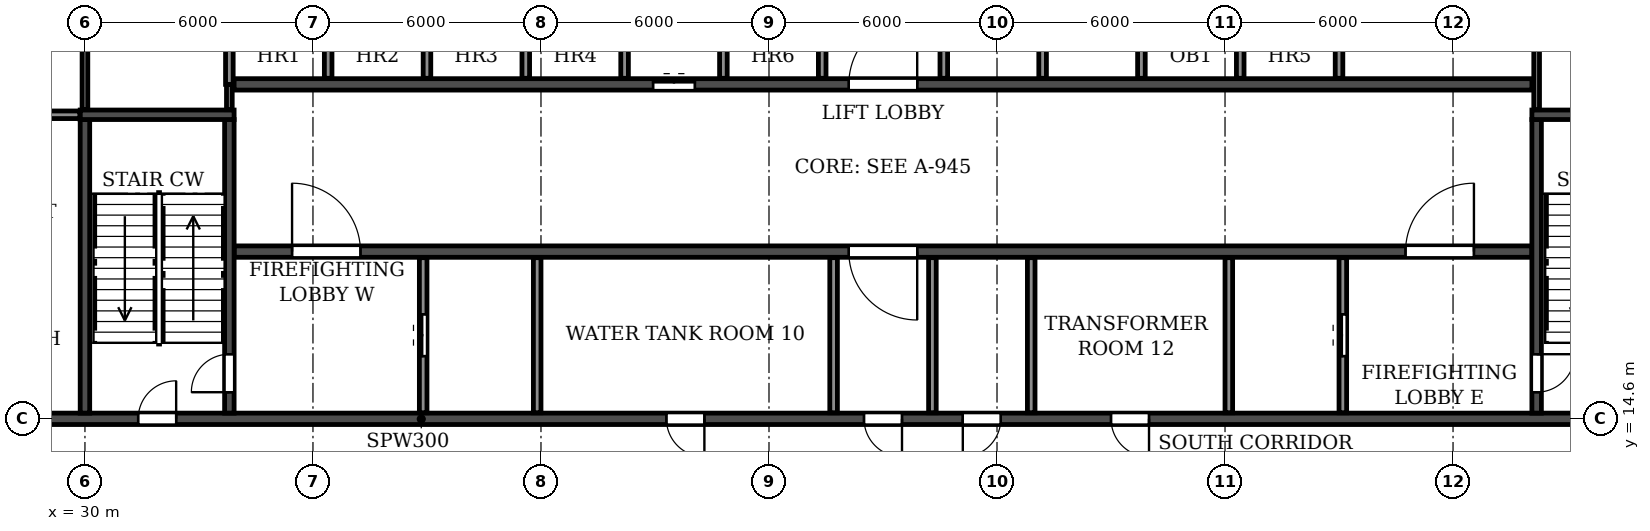
"""IFC4 building model, lengths in metres.
Left out: names, types, materials, properties, quantities, classifications, styles, units other than length and angle.
Written with IfcOpenShell. Run it as: python <this file> out.ifc"""

import sys

from ifc_helpers import new_model, si_unit, direction, frame, frame_2d, origin, place, context, subcontext, project, spatial, rectangle, extrude, element, fill, save


model = new_model("IFC4")
c1 = context("Model", 3, precision=1e-05, world=origin(), true_north=direction((0.0, 1.0)))
c2 = subcontext(c1, "Body", "Model", "MODEL_VIEW")
j1 = project(units=[si_unit("LENGTHUNIT", "METRE"), si_unit("PLANEANGLEUNIT", "RADIAN")], contexts=[c1])
p1 = place(None, origin())
s1 = spatial("IfcSite", under=j1, at=p1, CompositionType="ELEMENT")
p2 = place(p1, origin())
s2 = spatial("IfcBuilding", under=s1, at=p2, CompositionType="ELEMENT")
p3 = place(p2, frame((0.0, 0.0, 267.0)))
s3 = spatial("IfcBuildingStorey", under=s2, at=p3, CompositionType="ELEMENT", Elevation=267.0)
p4 = place(p3, frame((18.2, 14.6, 0.0), z_axis=(0.0, 0.0, 1.0), x_axis=(1.0, 0.0, 0.0)))
e1 = element("IfcWall", 1, at=p4, inside=s3, PredefinedType="SOLIDWALL", context=c2, shape_type="SweptSolid", body=[
    extrude(rectangle(XDim=65.6, YDim=0.3, at=frame_2d((32.8, 0.0))), origin(), (0.0, 0.0, 1.0), 5.15),
])
p5 = place(p4, frame((0.7, 0.0, 0.0)))
e2 = element("IfcOpeningElement", 2, at=p5, cuts=e1, PredefinedType="OPENING", context=c2, shape_type="SweptSolid", body=[
    extrude(rectangle(XDim=1.0, YDim=2.1, at=frame_2d((0.5, 1.05))), frame((0.0, 0.16, 0.0), z_axis=(0.0, -1.0, 0.0), x_axis=(1.0, 0.0, 0.0)), (0.0, 0.0, 1.0), 0.32),
])
p6 = place(p4, frame((8.35, 0.0, 0.0)))
e3 = element("IfcOpeningElement", 3, at=p6, cuts=e1, PredefinedType="OPENING", context=c2, shape_type="SweptSolid", body=[
    extrude(rectangle(XDim=1.5, YDim=2.1, at=frame_2d((0.75, 1.05))), frame((0.0, 0.16, 0.0), z_axis=(0.0, -1.0, 0.0), x_axis=(1.0, 0.0, 0.0)), (0.0, 0.0, 1.0), 0.32),
])
p7 = place(p4, frame((13.2, 0.0, 0.0)))
e4 = element("IfcOpeningElement", 4, at=p7, cuts=e1, PredefinedType="OPENING", context=c2, shape_type="SweptSolid", body=[
    extrude(rectangle(XDim=1.0, YDim=2.1, at=frame_2d((0.5, 1.05))), frame((0.0, 0.16, 0.0), z_axis=(0.0, -1.0, 0.0), x_axis=(1.0, 0.0, 0.0)), (0.0, 0.0, 1.0), 0.32),
])
p8 = place(p4, frame((27.1, 0.0, 0.0)))
e5 = element("IfcOpeningElement", 5, at=p8, cuts=e1, PredefinedType="OPENING", context=c2, shape_type="SweptSolid", body=[
    extrude(rectangle(XDim=1.0, YDim=2.1, at=frame_2d((0.5, 1.05))), frame((0.0, 0.16, 0.0), z_axis=(0.0, -1.0, 0.0), x_axis=(1.0, 0.0, 0.0)), (0.0, 0.0, 1.0), 0.32),
])
p9 = place(p4, frame((32.3, 0.0, 0.0)))
e6 = element("IfcOpeningElement", 6, at=p9, cuts=e1, PredefinedType="OPENING", context=c2, shape_type="SweptSolid", body=[
    extrude(rectangle(XDim=1.0, YDim=2.1, at=frame_2d((0.5, 1.05))), frame((0.0, 0.16, 0.0), z_axis=(0.0, -1.0, 0.0), x_axis=(1.0, 0.0, 0.0)), (0.0, 0.0, 1.0), 0.32),
])
p10 = place(p4, frame((34.9, 0.0, 0.0)))
e7 = element("IfcOpeningElement", 7, at=p10, cuts=e1, PredefinedType="OPENING", context=c2, shape_type="SweptSolid", body=[
    extrude(rectangle(XDim=1.0, YDim=2.1, at=frame_2d((0.5, 1.05))), frame((0.0, 0.16, 0.0), z_axis=(0.0, -1.0, 0.0), x_axis=(1.0, 0.0, 0.0)), (0.0, 0.0, 1.0), 0.32),
])
p11 = place(p4, frame((38.8, 0.0, 0.0)))
e8 = element("IfcOpeningElement", 8, at=p11, cuts=e1, PredefinedType="OPENING", context=c2, shape_type="SweptSolid", body=[
    extrude(rectangle(XDim=1.0, YDim=2.1, at=frame_2d((0.5, 1.05))), frame((0.0, 0.16, 0.0), z_axis=(0.0, -1.0, 0.0), x_axis=(1.0, 0.0, 0.0)), (0.0, 0.0, 1.0), 0.32),
])
p12 = place(p4, frame((51.4, 0.0, 0.0)))
e9 = element("IfcOpeningElement", 9, at=p12, cuts=e1, PredefinedType="OPENING", context=c2, shape_type="SweptSolid", body=[
    extrude(rectangle(XDim=1.0, YDim=2.1, at=frame_2d((0.5, 1.05))), frame((0.0, 0.16, 0.0), z_axis=(0.0, -1.0, 0.0), x_axis=(1.0, 0.0, 0.0)), (0.0, 0.0, 1.0), 0.32),
])
p13 = place(p4, frame((55.75, 0.0, 0.0)))
e10 = element("IfcOpeningElement", 10, at=p13, cuts=e1, PredefinedType="OPENING", context=c2, shape_type="SweptSolid", body=[
    extrude(rectangle(XDim=1.5, YDim=2.1, at=frame_2d((0.75, 1.05))), frame((0.0, 0.16, 0.0), z_axis=(0.0, -1.0, 0.0), x_axis=(1.0, 0.0, 0.0)), (0.0, 0.0, 1.0), 0.32),
])
p14 = place(p4, frame((63.9, 0.0, 0.0)))
e11 = element("IfcOpeningElement", 11, at=p14, cuts=e1, PredefinedType="OPENING", context=c2, shape_type="SweptSolid", body=[
    extrude(rectangle(XDim=1.0, YDim=2.1, at=frame_2d((0.5, 1.05))), frame((0.0, 0.16, 0.0), z_axis=(0.0, -1.0, 0.0), x_axis=(1.0, 0.0, 0.0)), (0.0, 0.0, 1.0), 0.32),
])
p15 = place(p3, frame((33.925, 19.0, 0.0), z_axis=(0.0, 0.0, 1.0), x_axis=(1.0, 0.0, 0.0)))
e12 = element("IfcWall", 12, at=p15, inside=s3, PredefinedType="SOLIDWALL", context=c2, shape_type="SweptSolid", body=[
    extrude(rectangle(XDim=34.15, YDim=0.3, at=frame_2d((17.075, 0.0))), origin(), (0.0, 0.0, 1.0), 5.15),
])
p16 = place(p15, frame((16.175, 0.0, 0.0)))
e13 = element("IfcOpeningElement", 13, at=p16, cuts=e12, PredefinedType="OPENING", context=c2, shape_type="SweptSolid", body=[
    extrude(rectangle(XDim=1.8, YDim=2.1, at=frame_2d((0.9, 1.05))), frame((0.0, 0.16, 0.0), z_axis=(0.0, -1.0, 0.0), x_axis=(1.0, 0.0, 0.0)), (0.0, 0.0, 1.0), 0.32),
])
p17 = place(p15, frame((1.525, 0.0, 0.0)))
e14 = element("IfcOpeningElement", 14, at=p17, cuts=e12, PredefinedType="OPENING", context=c2, shape_type="SweptSolid", body=[
    extrude(rectangle(XDim=1.8, YDim=2.1, at=frame_2d((0.9, 1.05))), frame((0.0, 0.16, 0.0), z_axis=(0.0, -1.0, 0.0), x_axis=(1.0, 0.0, 0.0)), (0.0, 0.0, 1.0), 0.32),
])
p18 = place(p15, frame((30.825, 0.0, 0.0)))
e15 = element("IfcOpeningElement", 15, at=p18, cuts=e12, PredefinedType="OPENING", context=c2, shape_type="SweptSolid", body=[
    extrude(rectangle(XDim=1.8, YDim=2.1, at=frame_2d((0.9, 1.05))), frame((0.0, 0.16, 0.0), z_axis=(0.0, -1.0, 0.0), x_axis=(1.0, 0.0, 0.0)), (0.0, 0.0, 1.0), 0.32),
])
p19 = place(p3, frame((33.925, 23.4, 0.0), z_axis=(0.0, 0.0, 1.0), x_axis=(1.0, 0.0, 0.0)))
e16 = element("IfcWall", 16, at=p19, inside=s3, PredefinedType="SOLIDWALL", context=c2, shape_type="SweptSolid", body=[
    extrude(rectangle(XDim=34.15, YDim=0.3, at=frame_2d((17.075, 0.0))), origin(), (0.0, 0.0, 1.0), 5.15),
])
p20 = place(p19, frame((16.175, 0.0, 0.0)))
e17 = element("IfcOpeningElement", 17, at=p20, cuts=e16, PredefinedType="OPENING", context=c2, shape_type="SweptSolid", body=[
    extrude(rectangle(XDim=1.8, YDim=2.1, at=frame_2d((0.9, 1.05))), frame((0.0, 0.16, 0.0), z_axis=(0.0, -1.0, 0.0), x_axis=(1.0, 0.0, 0.0)), (0.0, 0.0, 1.0), 0.32),
])
p21 = place(p19, frame((11.025, 0.0, 0.0)))
e18 = element("IfcOpeningElement", 18, at=p21, cuts=e16, PredefinedType="OPENING", context=c2, shape_type="SweptSolid", body=[
    extrude(rectangle(XDim=1.1, YDim=2.1, at=frame_2d((0.55, 1.05))), frame((0.0, 0.16, 0.0), z_axis=(0.0, -1.0, 0.0), x_axis=(1.0, 0.0, 0.0)), (0.0, 0.0, 1.0), 0.32),
])
p22 = place(p3, frame((30.0, 14.75, 0.0), z_axis=(0.0, 0.0, 1.0), x_axis=(0.0, 1.0, 0.0)))
e19 = element("IfcWall", 19, at=p22, inside=s3, PredefinedType="SOLIDWALL", context=c2, shape_type="SweptSolid", body=[
    extrude(rectangle(XDim=7.725, YDim=0.25, at=frame_2d((3.863, 0.0))), origin(), (0.0, 0.0, 1.0), 5.15),
])
p23 = place(p3, frame((33.8, 14.75, 0.0), z_axis=(0.0, 0.0, 1.0), x_axis=(0.0, 1.0, 0.0)))
e20 = element("IfcWall", 20, at=p23, inside=s3, PredefinedType="SOLIDWALL", context=c2, shape_type="SweptSolid", body=[
    extrude(rectangle(XDim=7.725, YDim=0.25, at=frame_2d((3.863, 0.0))), origin(), (0.0, 0.0, 1.0), 5.15),
])
p24 = place(p23, frame((0.55, 0.0, 0.0)))
e21 = element("IfcOpeningElement", 21, at=p24, cuts=e20, PredefinedType="OPENING", context=c2, shape_type="SweptSolid", body=[
    extrude(rectangle(XDim=1.0, YDim=2.1, at=frame_2d((0.5, 1.05))), frame((0.0, 0.135, 0.0), z_axis=(0.0, -1.0, 0.0), x_axis=(1.0, 0.0, 0.0)), (0.0, 0.0, 1.0), 0.27),
])
p25 = place(p3, frame((29.875, 22.6, 0.0), z_axis=(0.0, 0.0, 1.0), x_axis=(1.0, 0.0, 0.0)))
e22 = element("IfcWall", 22, at=p25, inside=s3, PredefinedType="SOLIDWALL", context=c2, shape_type="SweptSolid", body=[
    extrude(rectangle(XDim=4.05, YDim=0.25, at=frame_2d((2.025, 0.0))), origin(), (0.0, 0.0, 1.0), 5.15),
])
p26 = place(p3, frame((68.2, 14.75, 0.0), z_axis=(0.0, 0.0, 1.0), x_axis=(0.0, 1.0, 0.0)))
e23 = element("IfcWall", 23, at=p26, inside=s3, PredefinedType="SOLIDWALL", context=c2, shape_type="SweptSolid", body=[
    extrude(rectangle(XDim=7.725, YDim=0.25, at=frame_2d((3.863, 0.0))), origin(), (0.0, 0.0, 1.0), 5.15),
])
p27 = place(p26, frame((0.55, 0.0, 0.0)))
e24 = element("IfcOpeningElement", 24, at=p27, cuts=e23, PredefinedType="OPENING", context=c2, shape_type="SweptSolid", body=[
    extrude(rectangle(XDim=1.0, YDim=2.1, at=frame_2d((0.5, 1.05))), frame((0.0, 0.135, 0.0), z_axis=(0.0, -1.0, 0.0), x_axis=(1.0, 0.0, 0.0)), (0.0, 0.0, 1.0), 0.27),
])
p28 = place(p3, frame((68.075, 22.6, 0.0), z_axis=(0.0, 0.0, 1.0), x_axis=(1.0, 0.0, 0.0)))
e25 = element("IfcWall", 25, at=p28, inside=s3, PredefinedType="SOLIDWALL", context=c2, shape_type="SweptSolid", body=[
    extrude(rectangle(XDim=4.05, YDim=0.25, at=frame_2d((2.025, 0.0))), origin(), (0.0, 0.0, 1.0), 5.15),
])
p29 = place(p3, frame((24.735, 22.6, 0.0), z_axis=(0.0, 0.0, 1.0), x_axis=(1.0, 0.0, 0.0)))
e26 = element("IfcWall", 26, at=p29, inside=s3, PredefinedType="PARTITIONING", context=c2, shape_type="SweptSolid", body=[
    extrude(rectangle(XDim=5.13, YDim=0.2, at=frame_2d((2.565, 0.0))), origin(), (0.0, 0.0, 1.0), 5.15),
])
for number, where, z_axis, x_axis in (
    (27, (49.7, 14.76, 0.0), (0.0, 0.0, 1.0), (0.0, 1.0, 0.0)),
    (28, (52.3, 14.76, 0.0), (0.0, 0.0, 1.0), (0.0, 1.0, 0.0)),
):
    element("IfcWall", number, at=place(p3, frame(where, z_axis=z_axis, x_axis=x_axis)), inside=s3, PredefinedType="PARTITIONING", context=c2, shape_type="SweptSolid", body=[
        extrude(rectangle(XDim=4.08, YDim=0.2, at=frame_2d((2.04, 0.0))), origin(), (0.0, 0.0, 1.0), 5.15),
    ])
p30 = place(p3, frame((52.6, 23.56, 0.0), z_axis=(0.0, 0.0, 1.0), x_axis=(0.0, 1.0, 0.0)))
e29 = element("IfcWall", 29, at=p30, inside=s3, PredefinedType="PARTITIONING", context=c2, shape_type="SweptSolid", body=[
    extrude(rectangle(XDim=4.08, YDim=0.2, at=frame_2d((2.04, 0.0))), origin(), (0.0, 0.0, 1.0), 5.15),
])
p31 = place(p3, frame((54.9, 14.76, 0.0), z_axis=(0.0, 0.0, 1.0), x_axis=(0.0, 1.0, 0.0)))
e30 = element("IfcWall", 30, at=p31, inside=s3, PredefinedType="PARTITIONING", context=c2, shape_type="SweptSolid", body=[
    extrude(rectangle(XDim=4.08, YDim=0.2, at=frame_2d((2.04, 0.0))), origin(), (0.0, 0.0, 1.0), 5.15),
])
p32 = place(p3, frame((55.2, 23.56, 0.0), z_axis=(0.0, 0.0, 1.0), x_axis=(0.0, 1.0, 0.0)))
e31 = element("IfcWall", 31, at=p32, inside=s3, PredefinedType="PARTITIONING", context=c2, shape_type="SweptSolid", body=[
    extrude(rectangle(XDim=4.08, YDim=0.2, at=frame_2d((2.04, 0.0))), origin(), (0.0, 0.0, 1.0), 5.15),
])
p33 = place(p3, frame((30.0, 22.735, 0.0), z_axis=(0.0, 0.0, 1.0), x_axis=(0.0, 1.0, 0.0)))
e32 = element("IfcWall", 32, at=p33, inside=s3, PredefinedType="PARTITIONING", context=c2, shape_type="SweptSolid", body=[
    extrude(rectangle(XDim=4.905, YDim=0.15, at=frame_2d((2.452, 0.0))), origin(), (0.0, 0.0, 1.0), 5.15),
])
p34 = place(p3, frame((33.8, 22.735, 0.0), z_axis=(0.0, 0.0, 1.0), x_axis=(0.0, 1.0, 0.0)))
e33 = element("IfcWall", 33, at=p34, inside=s3, PredefinedType="PARTITIONING", context=c2, shape_type="SweptSolid", body=[
    extrude(rectangle(XDim=0.665, YDim=0.15, at=frame_2d((0.333, 0.0))), origin(), (0.0, 0.0, 1.0), 5.15),
])
p35 = place(p3, frame((68.2, 22.735, 0.0), z_axis=(0.0, 0.0, 1.0), x_axis=(0.0, 1.0, 0.0)))
e34 = element("IfcWall", 34, at=p35, inside=s3, PredefinedType="PARTITIONING", context=c2, shape_type="SweptSolid", body=[
    extrude(rectangle(XDim=4.905, YDim=0.15, at=frame_2d((2.452, 0.0))), origin(), (0.0, 0.0, 1.0), 5.15),
])
p36 = place(p3, frame((33.8, 23.4, 0.0), z_axis=(0.0, 0.0, 1.0), x_axis=(0.0, 1.0, 0.0)))
e35 = element("IfcWall", 35, at=p36, inside=s3, PredefinedType="PARTITIONING", context=c2, shape_type="SweptSolid", body=[
    extrude(rectangle(XDim=2.7, YDim=0.2, at=frame_2d((1.35, 0.0))), origin(), (0.0, 0.0, 1.0), 5.15),
])
p37 = place(p3, frame((36.4, 23.56, 0.0), z_axis=(0.0, 0.0, 1.0), x_axis=(0.0, 1.0, 0.0)))
e36 = element("IfcWall", 36, at=p37, inside=s3, PredefinedType="PARTITIONING", context=c2, shape_type="SweptSolid", body=[
    extrude(rectangle(XDim=2.54, YDim=0.2, at=frame_2d((1.27, 0.0))), origin(), (0.0, 0.0, 1.0), 5.15),
])
p38 = place(p3, frame((38.9, 14.76, 0.0), z_axis=(0.0, 0.0, 1.0), x_axis=(0.0, 1.0, 0.0)))
e37 = element("IfcWall", 37, at=p38, inside=s3, PredefinedType="PARTITIONING", context=c2, shape_type="SweptSolid", body=[
    extrude(rectangle(XDim=4.08, YDim=0.2, at=frame_2d((2.04, 0.0))), origin(), (0.0, 0.0, 1.0), 5.15),
])
p39 = place(p38, frame((1.49, 0.0, 0.0)))
e38 = element("IfcOpeningElement", 38, at=p39, cuts=e37, PredefinedType="OPENING", context=c2, shape_type="SweptSolid", body=[
    extrude(rectangle(XDim=1.1, YDim=2.1, at=frame_2d((0.55, 1.05))), frame((0.0, 0.11, 0.0), z_axis=(0.0, -1.0, 0.0), x_axis=(1.0, 0.0, 0.0)), (0.0, 0.0, 1.0), 0.22),
])
for number, where, z_axis, x_axis in (
    (39, (39.0, 23.56, 0.0), (0.0, 0.0, 1.0), (0.0, 1.0, 0.0)),
    (40, (41.6, 23.56, 0.0), (0.0, 0.0, 1.0), (0.0, 1.0, 0.0)),
):
    element("IfcWall", number, at=place(p3, frame(where, z_axis=z_axis, x_axis=x_axis)), inside=s3, PredefinedType="PARTITIONING", context=c2, shape_type="SweptSolid", body=[
        extrude(rectangle(XDim=2.54, YDim=0.2, at=frame_2d((1.27, 0.0))), origin(), (0.0, 0.0, 1.0), 5.15),
    ])
p40 = place(p3, frame((41.9, 14.76, 0.0), z_axis=(0.0, 0.0, 1.0), x_axis=(0.0, 1.0, 0.0)))
e41 = element("IfcWall", 41, at=p40, inside=s3, PredefinedType="PARTITIONING", context=c2, shape_type="SweptSolid", body=[
    extrude(rectangle(XDim=4.08, YDim=0.2, at=frame_2d((2.04, 0.0))), origin(), (0.0, 0.0, 1.0), 5.15),
])
for number, where, z_axis, x_axis in (
    (42, (44.2, 23.56, 0.0), (0.0, 0.0, 1.0), (0.0, 1.0, 0.0)),
    (43, (46.8, 23.56, 0.0), (0.0, 0.0, 1.0), (0.0, 1.0, 0.0)),
):
    element("IfcWall", number, at=place(p3, frame(where, z_axis=z_axis, x_axis=x_axis)), inside=s3, PredefinedType="PARTITIONING", context=c2, shape_type="SweptSolid", body=[
        extrude(rectangle(XDim=4.08, YDim=0.2, at=frame_2d((2.04, 0.0))), origin(), (0.0, 0.0, 1.0), 5.15),
    ])
for number, where, z_axis, x_axis in (
    (44, (49.4, 23.56, 0.0), (0.0, 0.0, 1.0), (0.0, 1.0, 0.0)),
    (45, (57.8, 23.56, 0.0), (0.0, 0.0, 1.0), (0.0, 1.0, 0.0)),
):
    element("IfcWall", number, at=place(p3, frame(where, z_axis=z_axis, x_axis=x_axis)), inside=s3, PredefinedType="PARTITIONING", context=c2, shape_type="SweptSolid", body=[
        extrude(rectangle(XDim=2.54, YDim=0.2, at=frame_2d((1.27, 0.0))), origin(), (0.0, 0.0, 1.0), 5.15),
    ])
p41 = place(p3, frame((60.1, 14.76, 0.0), z_axis=(0.0, 0.0, 1.0), x_axis=(0.0, 1.0, 0.0)))
e46 = element("IfcWall", 46, at=p41, inside=s3, PredefinedType="PARTITIONING", context=c2, shape_type="SweptSolid", body=[
    extrude(rectangle(XDim=4.08, YDim=0.2, at=frame_2d((2.04, 0.0))), origin(), (0.0, 0.0, 1.0), 5.15),
])
for number, where, z_axis, x_axis in (
    (47, (60.4, 23.56, 0.0), (0.0, 0.0, 1.0), (0.0, 1.0, 0.0)),
    (48, (63.0, 23.56, 0.0), (0.0, 0.0, 1.0), (0.0, 1.0, 0.0)),
):
    element("IfcWall", number, at=place(p3, frame(where, z_axis=z_axis, x_axis=x_axis)), inside=s3, PredefinedType="PARTITIONING", context=c2, shape_type="SweptSolid", body=[
        extrude(rectangle(XDim=2.54, YDim=0.2, at=frame_2d((1.27, 0.0))), origin(), (0.0, 0.0, 1.0), 5.15),
    ])
p42 = place(p3, frame((63.1, 14.76, 0.0), z_axis=(0.0, 0.0, 1.0), x_axis=(0.0, 1.0, 0.0)))
e49 = element("IfcWall", 49, at=p42, inside=s3, PredefinedType="PARTITIONING", context=c2, shape_type="SweptSolid", body=[
    extrude(rectangle(XDim=4.08, YDim=0.2, at=frame_2d((2.04, 0.0))), origin(), (0.0, 0.0, 1.0), 5.15),
])
p43 = place(p42, frame((1.49, 0.0, 0.0)))
e50 = element("IfcOpeningElement", 50, at=p43, cuts=e49, PredefinedType="OPENING", context=c2, shape_type="SweptSolid", body=[
    extrude(rectangle(XDim=1.1, YDim=2.1, at=frame_2d((0.55, 1.05))), frame((0.0, 0.11, 0.0), z_axis=(0.0, -1.0, 0.0), x_axis=(1.0, 0.0, 0.0)), (0.0, 0.0, 1.0), 0.22),
])
p44 = place(p7, origin())
e51 = element("IfcDoor", 51, at=p44, inside=s3, OperationType="SINGLE_SWING_RIGHT", PredefinedType="DOOR", context=c2, shape_type="SweptSolid", body=[
    extrude(rectangle(XDim=1.0, YDim=2.1, at=frame_2d((0.5, 1.05))), frame((0.0, 0.025, 0.0), z_axis=(0.0, -1.0, 0.0), x_axis=(1.0, 0.0, 0.0)), (0.0, 0.0, 1.0), 0.05),
])
fill(e4, e51)
p45 = place(p8, frame((1.0, 0.0, 0.0), z_axis=(0.0, 0.0, 1.0), x_axis=(-1.0, 0.0, 0.0)))
e52 = element("IfcDoor", 52, at=p45, inside=s3, OperationType="SINGLE_SWING_LEFT", PredefinedType="DOOR", context=c2, shape_type="SweptSolid", body=[
    extrude(rectangle(XDim=1.0, YDim=2.1, at=frame_2d((0.5, 1.05))), frame((0.0, 0.025, 0.0), z_axis=(0.0, -1.0, 0.0), x_axis=(1.0, 0.0, 0.0)), (0.0, 0.0, 1.0), 0.05),
])
fill(e5, e52)
p46 = place(p9, frame((1.0, 0.0, 0.0), z_axis=(0.0, 0.0, 1.0), x_axis=(-1.0, 0.0, 0.0)))
e53 = element("IfcDoor", 53, at=p46, inside=s3, OperationType="SINGLE_SWING_LEFT", PredefinedType="DOOR", context=c2, shape_type="SweptSolid", body=[
    extrude(rectangle(XDim=1.0, YDim=2.1, at=frame_2d((0.5, 1.05))), frame((0.0, 0.025, 0.0), z_axis=(0.0, -1.0, 0.0), x_axis=(1.0, 0.0, 0.0)), (0.0, 0.0, 1.0), 0.05),
])
fill(e6, e53)
p47 = place(p10, frame((1.0, 0.0, 0.0), z_axis=(0.0, 0.0, 1.0), x_axis=(-1.0, 0.0, 0.0)))
e54 = element("IfcDoor", 54, at=p47, inside=s3, OperationType="SINGLE_SWING_RIGHT", PredefinedType="DOOR", context=c2, shape_type="SweptSolid", body=[
    extrude(rectangle(XDim=1.0, YDim=2.1, at=frame_2d((0.5, 1.05))), frame((0.0, 0.025, 0.0), z_axis=(0.0, -1.0, 0.0), x_axis=(1.0, 0.0, 0.0)), (0.0, 0.0, 1.0), 0.05),
])
fill(e7, e54)
p48 = place(p11, frame((1.0, 0.0, 0.0), z_axis=(0.0, 0.0, 1.0), x_axis=(-1.0, 0.0, 0.0)))
e55 = element("IfcDoor", 55, at=p48, inside=s3, OperationType="SINGLE_SWING_LEFT", PredefinedType="DOOR", context=c2, shape_type="SweptSolid", body=[
    extrude(rectangle(XDim=1.0, YDim=2.1, at=frame_2d((0.5, 1.05))), frame((0.0, 0.025, 0.0), z_axis=(0.0, -1.0, 0.0), x_axis=(1.0, 0.0, 0.0)), (0.0, 0.0, 1.0), 0.05),
])
fill(e8, e55)
p49 = place(p43, origin())
e56 = element("IfcDoor", 56, at=p49, inside=s3, OperationType="DOUBLE_DOOR_SLIDING", PredefinedType="DOOR", context=c2, shape_type="SweptSolid", body=[
    extrude(rectangle(XDim=1.1, YDim=2.1, at=frame_2d((0.55, 1.05))), frame((0.0, 0.025, 0.0), z_axis=(0.0, -1.0, 0.0), x_axis=(1.0, 0.0, 0.0)), (0.0, 0.0, 1.0), 0.05),
])
fill(e50, e56)
p50 = place(p27, frame((1.0, 0.0, 0.0), z_axis=(0.0, 0.0, 1.0), x_axis=(-1.0, 0.0, 0.0)))
e57 = element("IfcDoor", 57, at=p50, inside=s3, OperationType="SINGLE_SWING_LEFT", PredefinedType="DOOR", context=c2, shape_type="SweptSolid", body=[
    extrude(rectangle(XDim=1.0, YDim=2.1, at=frame_2d((0.5, 1.05))), frame((0.0, 0.025, 0.0), z_axis=(0.0, -1.0, 0.0), x_axis=(1.0, 0.0, 0.0)), (0.0, 0.0, 1.0), 0.05),
])
fill(e24, e57)
p51 = place(p24, origin())
e58 = element("IfcDoor", 58, at=p51, inside=s3, OperationType="SINGLE_SWING_LEFT", PredefinedType="DOOR", context=c2, shape_type="SweptSolid", body=[
    extrude(rectangle(XDim=1.0, YDim=2.1, at=frame_2d((0.5, 1.05))), frame((0.0, 0.025, 0.0), z_axis=(0.0, -1.0, 0.0), x_axis=(1.0, 0.0, 0.0)), (0.0, 0.0, 1.0), 0.05),
])
fill(e21, e58)
p52 = place(p39, origin())
e59 = element("IfcDoor", 59, at=p52, inside=s3, OperationType="DOUBLE_DOOR_SLIDING", PredefinedType="DOOR", context=c2, shape_type="SweptSolid", body=[
    extrude(rectangle(XDim=1.1, YDim=2.1, at=frame_2d((0.55, 1.05))), frame((0.0, 0.025, 0.0), z_axis=(0.0, -1.0, 0.0), x_axis=(1.0, 0.0, 0.0)), (0.0, 0.0, 1.0), 0.05),
])
fill(e38, e59)
p53 = place(p20, origin())
e60 = element("IfcDoor", 60, at=p53, inside=s3, OperationType="DOUBLE_DOOR_SINGLE_SWING", PredefinedType="DOOR", context=c2, shape_type="SweptSolid", body=[
    extrude(rectangle(XDim=1.8, YDim=2.1, at=frame_2d((0.9, 1.05))), frame((0.0, 0.025, 0.0), z_axis=(0.0, -1.0, 0.0), x_axis=(1.0, 0.0, 0.0)), (0.0, 0.0, 1.0), 0.05),
])
fill(e17, e60)
p54 = place(p16, frame((1.8, 0.0, 0.0), z_axis=(0.0, 0.0, 1.0), x_axis=(-1.0, 0.0, 0.0)))
e61 = element("IfcDoor", 61, at=p54, inside=s3, OperationType="DOUBLE_DOOR_SINGLE_SWING", PredefinedType="DOOR", context=c2, shape_type="SweptSolid", body=[
    extrude(rectangle(XDim=1.8, YDim=2.1, at=frame_2d((0.9, 1.05))), frame((0.0, 0.025, 0.0), z_axis=(0.0, -1.0, 0.0), x_axis=(1.0, 0.0, 0.0)), (0.0, 0.0, 1.0), 0.05),
])
fill(e13, e61)
p55 = place(p17, origin())
e62 = element("IfcDoor", 62, at=p55, inside=s3, OperationType="DOUBLE_DOOR_SINGLE_SWING", PredefinedType="DOOR", context=c2, shape_type="SweptSolid", body=[
    extrude(rectangle(XDim=1.8, YDim=2.1, at=frame_2d((0.9, 1.05))), frame((0.0, 0.025, 0.0), z_axis=(0.0, -1.0, 0.0), x_axis=(1.0, 0.0, 0.0)), (0.0, 0.0, 1.0), 0.05),
])
fill(e14, e62)
p56 = place(p21, origin())
e63 = element("IfcDoor", 63, at=p56, inside=s3, OperationType="DOUBLE_DOOR_SLIDING", PredefinedType="DOOR", context=c2, shape_type="SweptSolid", body=[
    extrude(rectangle(XDim=1.1, YDim=2.1, at=frame_2d((0.55, 1.05))), frame((0.0, 0.025, 0.0), z_axis=(0.0, -1.0, 0.0), x_axis=(1.0, 0.0, 0.0)), (0.0, 0.0, 1.0), 0.05),
])
fill(e18, e63)
p57 = place(p18, origin())
e64 = element("IfcDoor", 64, at=p57, inside=s3, OperationType="DOUBLE_DOOR_SINGLE_SWING", PredefinedType="DOOR", context=c2, shape_type="SweptSolid", body=[
    extrude(rectangle(XDim=1.8, YDim=2.1, at=frame_2d((0.9, 1.05))), frame((0.0, 0.025, 0.0), z_axis=(0.0, -1.0, 0.0), x_axis=(1.0, 0.0, 0.0)), (0.0, 0.0, 1.0), 0.05),
])
fill(e15, e64)
save(model, sys.argv[1])
